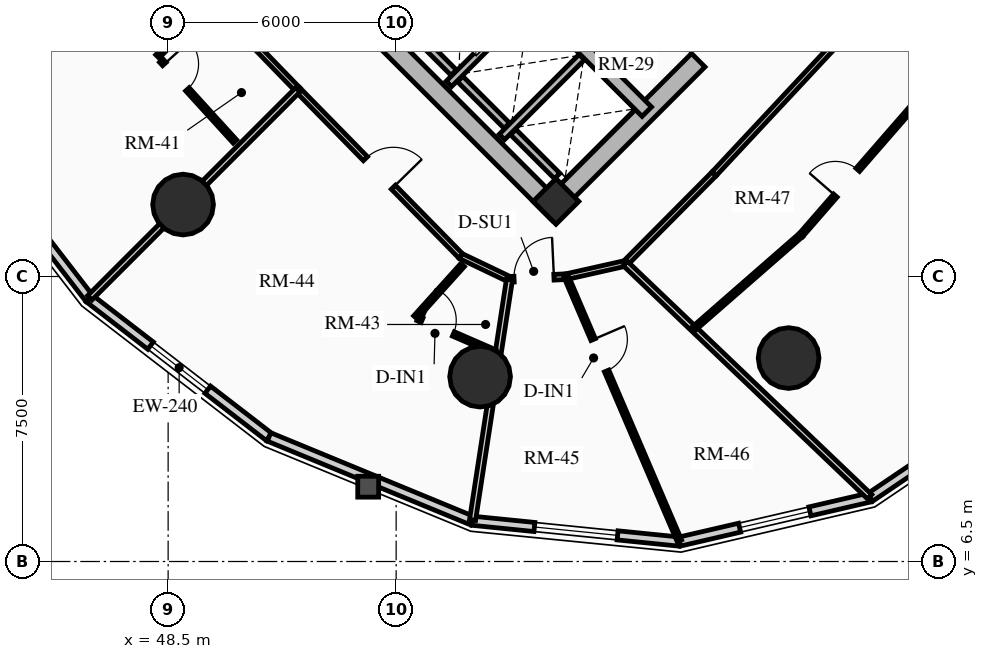
"""IFC4 building model, lengths in metres.
Left out: names, types, materials, properties, quantities, classifications, styles, units other than length and angle.
Written with IfcOpenShell. Run it as: python <this file> out.ifc"""

import sys

from ifc_helpers import new_model, si_unit, direction, frame, frame_2d, origin, origin_2d, place, context, subcontext, project, spatial, rectangle, circle, extrude, source, transform, mapped, element, fill, save


model = new_model("IFC4")
c1 = context("Model", 3, precision=1e-05, world=origin(), true_north=direction((0.0, 1.0)))
c2 = subcontext(c1, "Body", "Model", "MODEL_VIEW")
j1 = project(units=[si_unit("LENGTHUNIT", "METRE"), si_unit("PLANEANGLEUNIT", "RADIAN")], contexts=[c1])
p1 = place(None, origin())
s1 = spatial("IfcSite", under=j1, at=p1, CompositionType="ELEMENT")
p2 = place(p1, origin())
s2 = spatial("IfcBuilding", under=s1, at=p2, CompositionType="ELEMENT")
p3 = place(p2, frame((0.0, 0.0, 51.1)))
s3 = spatial("IfcBuildingStorey", under=s2, at=p3, CompositionType="ELEMENT", Elevation=51.1)
p4 = place(p3, frame((58.773, 15.661, 0.0), z_axis=(0.0, 0.0, 1.0), x_axis=(-0.707106781187, 0.707106781187, 0.0)))
e1 = element("IfcWall", 1, at=p4, inside=s3, PredefinedType="SHEAR", context=c2, shape_type="SweptSolid", body=[
    extrude(rectangle(XDim=14.3, YDim=0.5, at=frame_2d((7.15, 0.0))), origin(), (0.0, 0.0, 1.0), 2.91),
])
p5 = place(p3, frame((58.596, 15.838, 0.0), z_axis=(0.0, 0.0, 1.0), x_axis=(0.707106781187, 0.707106781187, 0.0)))
e2 = element("IfcWall", 2, at=p5, inside=s3, PredefinedType="SHEAR", context=c2, shape_type="SweptSolid", body=[
    extrude(rectangle(XDim=10.7, YDim=0.5, at=frame_2d((5.35, 0.0))), origin(), (0.0, 0.0, 1.0), 2.91),
])
m1 = source(origin(), c2, "Body", "SweptSolid", [
    extrude(rectangle(XDim=1.5, YDim=2.02, at=frame_2d((0.75, 1.01))), frame((0.0, 0.26, 0.0), z_axis=(0.0, -1.0, 0.0), x_axis=(1.0, 0.0, 0.0)), (0.0, 0.0, 1.0), 0.52),
])
p6 = place(p5, frame((5.45, 0.0, 0.0)))
e3 = element("IfcOpeningElement", 3, at=p6, cuts=e2, PredefinedType="OPENING", context=c2, shape_type="MappedRepresentation", body=[
    mapped(m1, transform((0.0, 0.0, 0.0), x_axis=(1.0, 0.0, 0.0), y_axis=(0.0, 1.0, 0.0), z_axis=(0.0, 0.0, 1.0), scale=1.0)),
])
p7 = place(p3, frame((61.096, 18.338, 0.0), z_axis=(0.0, 0.0, 1.0), x_axis=(-0.707106781187, 0.707106781187, 0.0)))
e4 = element("IfcWall", 4, at=p7, inside=s3, PredefinedType="SHEAR", context=c2, shape_type="SweptSolid", body=[
    extrude(rectangle(XDim=13.8, YDim=0.35, at=frame_2d((6.9, 0.0))), origin(), (0.0, 0.0, 1.0), 2.91),
])
m2 = source(origin(), c2, "Body", "SweptSolid", [
    extrude(rectangle(XDim=1.1, YDim=2.015, at=frame_2d((0.55, 1.007))), frame((0.0, 0.185, 0.0), z_axis=(0.0, -1.0, 0.0), x_axis=(1.0, 0.0, 0.0)), (0.0, 0.0, 1.0), 0.37),
])
p8 = place(p7, frame((4.9, 0.0, 0.0)))
e5 = element("IfcOpeningElement", 5, at=p8, cuts=e4, PredefinedType="OPENING", context=c2, shape_type="MappedRepresentation", body=[
    mapped(m2, transform((0.0, 0.0, 0.0), x_axis=(1.0, 0.0, 0.0), y_axis=(0.0, 1.0, 0.0), z_axis=(0.0, 0.0, 1.0), scale=1.0)),
])
m3 = source(origin(), c2, "Body", "SweptSolid", [
    extrude(rectangle(XDim=1.15, YDim=2.02, at=frame_2d((0.575, 1.01))), frame((0.0, 0.185, 0.0), z_axis=(0.0, -1.0, 0.0), x_axis=(1.0, 0.0, 0.0)), (0.0, 0.0, 1.0), 0.37),
])
p9 = place(p7, frame((7.32, 0.0, 0.0)))
e6 = element("IfcOpeningElement", 6, at=p9, cuts=e4, PredefinedType="OPENING", context=c2, shape_type="MappedRepresentation", body=[
    mapped(m3, transform((0.0, 0.0, 0.0), x_axis=(1.0, 0.0, 0.0), y_axis=(0.0, 1.0, 0.0), z_axis=(0.0, 0.0, 1.0), scale=1.0)),
])
p10 = place(p3, frame((58.706, 15.976, 0.0), z_axis=(0.0, 0.0, 1.0), x_axis=(0.707106781187, 0.707106781187, 0.0)))
e7 = element("IfcColumn", 7, at=p10, inside=s3, PredefinedType="COLUMN", context=c2, shape_type="SweptSolid", body=[
    extrude(rectangle(XDim=0.85, YDim=0.85, at=origin_2d()), origin(), (0.0, 0.0, 1.0), 2.91),
])
for number, where, z_axis, x_axis in (
    (8, (48.893, 15.893, 0.0), (0.0, 0.0, 1.0), (1.0, 0.0, 0.0)),
    (9, (56.709, 11.365, 0.0), (0.0, 0.0, 1.0), (1.0, 0.0, 0.0)),
    (10, (64.827, 11.854, 0.0), (0.0, 0.0, 1.0), (1.0, 0.0, 0.0)),
):
    element("IfcColumn", number, at=place(p3, frame(where, z_axis=z_axis, x_axis=x_axis)), inside=s3, PredefinedType="USERDEFINED", context=c2, shape_type="SweptSolid", body=[
        extrude(circle(Radius=0.8, at=origin_2d()), origin(), (0.0, 0.0, 1.0), 2.91),
    ])
p11 = place(p3, frame((46.425, 13.425, 0.0), z_axis=(0.0, 0.0, 1.0), x_axis=(-0.610502519057, 0.792014314407, 0.0)))
e11 = element("IfcWall", 11, at=p11, inside=s3, PredefinedType="SOLIDWALL", context=c2, shape_type="SweptSolid", body=[
    extrude(rectangle(XDim=5.973, YDim=0.24, at=frame_2d((2.987, 0.0))), origin(), (0.0, 0.0, 1.0), 2.073),
])
p12 = place(p3, frame((51.156, 9.778, 0.0), z_axis=(0.0, 0.0, 1.0), x_axis=(-0.792014314407, 0.610502519057, 0.0)))
e12 = element("IfcWall", 12, at=p12, inside=s3, PredefinedType="SOLIDWALL", context=c2, shape_type="SweptSolid", body=[
    extrude(rectangle(XDim=5.973, YDim=0.24, at=frame_2d((2.987, 0.0))), origin(), (0.0, 0.0, 1.0), 2.073),
])
m4 = source(origin(), c2, "Body", "SweptSolid", [
    extrude(rectangle(XDim=1.9, YDim=1.35, at=frame_2d((0.95, 0.675))), frame((0.0, 0.13, 0.0), z_axis=(0.0, -1.0, 0.0), x_axis=(1.0, 0.0, 0.0)), (0.0, 0.0, 1.0), 0.26),
])
p13 = place(p12, frame((2.037, 0.0, 0.65)))
e13 = element("IfcOpeningElement", 13, at=p13, cuts=e12, PredefinedType="OPENING", context=c2, shape_type="MappedRepresentation", body=[
    mapped(m4, transform((0.0, 0.0, 0.0), x_axis=(1.0, 0.0, 0.0), y_axis=(0.0, 1.0, 0.0), z_axis=(0.0, 0.0, 1.0), scale=1.0)),
])
p14 = place(p3, frame((56.507, 7.572, 0.0), z_axis=(0.0, 0.0, 1.0), x_axis=(-0.924563629567, 0.381027682565, 0.0)))
e14 = element("IfcWall", 14, at=p14, inside=s3, PredefinedType="SOLIDWALL", context=c2, shape_type="SweptSolid", body=[
    extrude(rectangle(XDim=5.789, YDim=0.24, at=frame_2d((2.894, 0.0))), origin(), (0.0, 0.0, 1.0), 2.073),
])
p15 = place(p3, frame((61.957, 7.024, 0.0), z_axis=(0.0, 0.0, 1.0), x_axis=(-0.994970765694, 0.100165739718, 0.0)))
e15 = element("IfcWall", 15, at=p15, inside=s3, PredefinedType="SOLIDWALL", context=c2, shape_type="SweptSolid", body=[
    extrude(rectangle(XDim=5.477, YDim=0.24, at=frame_2d((2.738, 0.0))), origin(), (0.0, 0.0, 1.0), 2.073),
])
m5 = source(origin(), c2, "Body", "SweptSolid", [
    extrude(rectangle(XDim=2.2, YDim=1.35, at=frame_2d((1.1, 0.675))), frame((0.0, 0.13, 0.0), z_axis=(0.0, -1.0, 0.0), x_axis=(1.0, 0.0, 0.0)), (0.0, 0.0, 1.0), 0.26),
])
p16 = place(p15, frame((1.638, 0.0, 0.65)))
e16 = element("IfcOpeningElement", 16, at=p16, cuts=e15, PredefinedType="OPENING", context=c2, shape_type="MappedRepresentation", body=[
    mapped(m5, transform((0.0, 0.0, 0.0), x_axis=(1.0, 0.0, 0.0), y_axis=(0.0, 1.0, 0.0), z_axis=(0.0, 0.0, 1.0), scale=1.0)),
])
p17 = place(p3, frame((66.969, 8.186, 0.0), z_axis=(0.0, 0.0, 1.0), x_axis=(-0.974166016949, -0.225833060959, 0.0)))
e17 = element("IfcWall", 17, at=p17, inside=s3, PredefinedType="SOLIDWALL", context=c2, shape_type="SweptSolid", body=[
    extrude(rectangle(XDim=5.146, YDim=0.24, at=frame_2d((2.573, 0.0))), origin(), (0.0, 0.0, 1.0), 2.073),
])
p18 = place(p17, frame((1.623, 0.0, 0.65)))
e18 = element("IfcOpeningElement", 18, at=p18, cuts=e17, PredefinedType="OPENING", context=c2, shape_type="MappedRepresentation", body=[
    mapped(m4, transform((0.0, 0.0, 0.0), x_axis=(1.0, 0.0, 0.0), y_axis=(0.0, 1.0, 0.0), z_axis=(0.0, 0.0, 1.0), scale=1.0)),
])
p19 = place(p3, frame((71.055, 10.945, 0.0), z_axis=(0.0, 0.0, 1.0), x_axis=(-0.828736708604, -0.559638693991, 0.0)))
e19 = element("IfcWall", 19, at=p19, inside=s3, PredefinedType="SOLIDWALL", context=c2, shape_type="SweptSolid", body=[
    extrude(rectangle(XDim=4.93, YDim=0.24, at=frame_2d((2.465, 0.0))), origin(), (0.0, 0.0, 1.0), 2.073),
])
p20 = place(p3, frame((55.888, 19.069, 0.0), z_axis=(0.0, 0.0, 1.0), x_axis=(0.707106781187, 0.707106781187, 0.0)))
e20 = element("IfcWall", 20, at=p20, inside=s3, PredefinedType="SHEAR", context=c2, shape_type="SweptSolid", body=[
    extrude(rectangle(XDim=2.97, YDim=0.2, at=frame_2d((1.485, 0.0))), origin(), (0.0, 0.0, 1.0), 2.91),
])
p21 = place(p3, frame((56.015, 19.366, 0.0), z_axis=(0.0, 0.0, 1.0), x_axis=(-0.707106781187, 0.707106781187, 0.0)))
e21 = element("IfcWall", 21, at=p21, inside=s3, PredefinedType="SHEAR", context=c2, shape_type="SweptSolid", body=[
    extrude(rectangle(XDim=2.44, YDim=0.2, at=frame_2d((1.22, 0.0))), origin(), (0.0, 0.0, 1.0), 2.91),
])
p22 = place(p3, frame((57.284, 17.673, 0.0), z_axis=(0.0, 0.0, 1.0), x_axis=(0.707147878904, 0.70706568108, 0.0)))
e22 = element("IfcWall", 22, at=p22, inside=s3, PredefinedType="SHEAR", context=c2, shape_type="SweptSolid", body=[
    extrude(rectangle(XDim=2.97, YDim=0.2, at=frame_2d((1.485, 0.0))), origin(), (0.0, 0.0, 1.0), 2.91),
])
p23 = place(p3, frame((57.412, 17.97, 0.0), z_axis=(0.0, 0.0, 1.0), x_axis=(-0.707106781187, 0.707106781187, 0.0)))
e23 = element("IfcWall", 23, at=p23, inside=s3, PredefinedType="SHEAR", context=c2, shape_type="SweptSolid", body=[
    extrude(rectangle(XDim=1.735, YDim=0.2, at=frame_2d((0.867, 0.0))), origin(), (0.0, 0.0, 1.0), 2.91),
])
p24 = place(p3, frame((58.737, 16.644, 0.0), z_axis=(0.0, 0.0, 1.0), x_axis=(-0.707032117043, 0.707181437447, 0.0)))
e24 = element("IfcWall", 24, at=p24, inside=s3, PredefinedType="SHEAR", context=c2, shape_type="SweptSolid", body=[
    extrude(rectangle(XDim=1.635, YDim=0.2, at=frame_2d((0.817, 0.0))), origin(), (0.0, 0.0, 1.0), 2.91),
])
p25 = place(p3, frame((47.729, 23.23, 0.0), z_axis=(0.0, 0.0, 1.0), x_axis=(0.696119834292, -0.717925606386, 0.0)))
e25 = element("IfcWall", 25, at=p25, inside=s3, PredefinedType="PARTITIONING", context=c2, shape_type="SweptSolid", body=[
    extrude(rectangle(XDim=6.012, YDim=0.15, at=frame_2d((3.006, 0.0))), origin(), (0.0, 0.0, 1.0), 2.635),
])
p26 = place(p3, frame((51.914, 18.914, 0.0), z_axis=(0.0, 0.0, 1.0), x_axis=(0.6999614951, -0.71418058317, 0.0)))
e26 = element("IfcWall", 26, at=p26, inside=s3, PredefinedType="PARTITIONING", context=c2, shape_type="SweptSolid", body=[
    extrude(rectangle(XDim=6.13, YDim=0.15, at=frame_2d((3.065, 0.0))), origin(), (0.0, 0.0, 1.0), 2.159),
])
m6 = source(origin(), c2, "Body", "SweptSolid", [
    extrude(rectangle(XDim=1.05, YDim=2.015, at=frame_2d((0.525, 1.007))), frame((0.0, 0.085, 0.0), z_axis=(0.0, -1.0, 0.0), x_axis=(1.0, 0.0, 0.0)), (0.0, 0.0, 1.0), 0.17),
])
p27 = place(p26, frame((2.54, 0.0, 0.0)))
e27 = element("IfcOpeningElement", 27, at=p27, cuts=e26, PredefinedType="OPENING", context=c2, shape_type="MappedRepresentation", body=[
    mapped(m6, transform((0.0, 0.0, 0.0), x_axis=(1.0, 0.0, 0.0), y_axis=(0.0, 1.0, 0.0), z_axis=(0.0, 0.0, 1.0), scale=1.0)),
])
p28 = place(p3, frame((56.204, 14.536, 0.0), z_axis=(0.0, 0.0, 1.0), x_axis=(0.902244982981, -0.431223828986, 0.0)))
e28 = element("IfcWall", 28, at=p28, inside=s3, PredefinedType="PARTITIONING", context=c2, shape_type="SweptSolid", body=[
    extrude(rectangle(XDim=1.417, YDim=0.15, at=frame_2d((0.708, 0.0))), origin(), (0.0, 0.0, 1.0), 2.205),
])
p29 = place(p3, frame((57.483, 13.925, 0.0), z_axis=(0.0, 0.0, 1.0), x_axis=(0.998884345706, 0.047223552414, 0.0)))
e29 = element("IfcWall", 29, at=p29, inside=s3, PredefinedType="PARTITIONING", context=c2, shape_type="SweptSolid", body=[
    extrude(rectangle(XDim=1.494, YDim=0.15, at=frame_2d((0.747, 0.0))), origin(), (0.0, 0.0, 1.0), 2.159),
])
p30 = place(p29, frame((0.12, 0.0, 0.0)))
e30 = element("IfcOpeningElement", 30, at=p30, cuts=e29, PredefinedType="OPENING", context=c2, shape_type="MappedRepresentation", body=[
    mapped(m6, transform((0.0, 0.0, 0.0), x_axis=(1.0, 0.0, 0.0), y_axis=(0.0, 1.0, 0.0), z_axis=(0.0, 0.0, 1.0), scale=1.0)),
])
p31 = place(p3, frame((58.975, 13.996, 0.0), z_axis=(0.0, 0.0, 1.0), x_axis=(0.975700857392, 0.219106907431, 0.0)))
e31 = element("IfcWall", 31, at=p31, inside=s3, PredefinedType="PARTITIONING", context=c2, shape_type="SweptSolid", body=[
    extrude(rectangle(XDim=1.591, YDim=0.15, at=frame_2d((0.795, 0.0))), origin(), (0.0, 0.0, 1.0), 2.205),
])
p32 = place(p3, frame((60.528, 14.344, 0.0), z_axis=(0.0, 0.0, 1.0), x_axis=(0.704381645997, 0.709821454158, 0.0)))
e32 = element("IfcWall", 32, at=p32, inside=s3, PredefinedType="PARTITIONING", context=c2, shape_type="SweptSolid", body=[
    extrude(rectangle(XDim=3.321, YDim=0.15, at=frame_2d((1.661, 0.0))), origin(), (0.0, 0.0, 1.0), 2.159),
])
p33 = place(p3, frame((62.867, 16.702, 0.0), z_axis=(0.0, 0.0, 1.0), x_axis=(0.682449206191, 0.73093302085, 0.0)))
e33 = element("IfcWall", 33, at=p33, inside=s3, PredefinedType="PARTITIONING", context=c2, shape_type="SweptSolid", body=[
    extrude(rectangle(XDim=6.642, YDim=0.15, at=frame_2d((3.321, 0.0))), origin(), (0.0, 0.0, 1.0), 2.159),
])
p34 = place(p3, frame((51.914, 18.914, 0.0), z_axis=(0.0, 0.0, 1.0), x_axis=(-0.707106781187, -0.707106781187, 0.0)))
e34 = element("IfcWall", 34, at=p34, inside=s3, PredefinedType="PARTITIONING", context=c2, shape_type="SweptSolid", body=[
    extrude(rectangle(XDim=7.743, YDim=0.16, at=frame_2d((3.872, 0.0))), origin(), (0.0, 0.0, 1.0), 2.073),
])
p35 = place(p3, frame((57.483, 13.925, 0.0), z_axis=(0.0, 0.0, 1.0), x_axis=(-0.151762268519, -0.988417024264, 0.0)))
e35 = element("IfcWall", 35, at=p35, inside=s3, PredefinedType="PARTITIONING", context=c2, shape_type="SweptSolid", body=[
    extrude(rectangle(XDim=6.407, YDim=0.16, at=frame_2d((3.204, 0.0))), origin(), (0.0, 0.0, 1.0), 2.073),
])
p36 = place(p3, frame((60.528, 14.344, 0.0), z_axis=(0.0, 0.0, 1.0), x_axis=(0.723320016743, -0.690512963947, 0.0)))
e36 = element("IfcWall", 36, at=p36, inside=s3, PredefinedType="PARTITIONING", context=c2, shape_type="SweptSolid", body=[
    extrude(rectangle(XDim=8.893, YDim=0.16, at=frame_2d((4.446, 0.0))), origin(), (0.0, 0.0, 1.0), 2.073),
])
p37 = place(p3, frame((49.498, 21.087, 0.0), z_axis=(0.0, 0.0, 1.0), x_axis=(-0.702129708151, -0.71204906638, 0.0)))
e37 = element("IfcWall", 37, at=p37, inside=s3, PredefinedType="PARTITIONING", context=c2, shape_type="SweptSolid", body=[
    extrude(rectangle(XDim=1.821, YDim=0.125, at=frame_2d((0.911, 0.0))), origin(), (0.0, 0.0, 1.0), 2.635),
])
p38 = place(p3, frame((48.32, 19.68, 0.0), z_axis=(0.0, 0.0, 1.0), x_axis=(0.673403410236, -0.739275217414, 0.0)))
e38 = element("IfcWall", 38, at=p38, inside=s3, PredefinedType="PARTITIONING", context=c2, shape_type="SweptSolid", body=[
    extrude(rectangle(XDim=2.876, YDim=0.125, at=frame_2d((1.438, 0.0))), origin(), (0.0, 0.0, 1.0), 2.635),
])
m7 = source(origin(), c2, "Body", "SweptSolid", [
    extrude(rectangle(XDim=0.9, YDim=2.005, at=frame_2d((0.45, 1.002))), frame((0.0, 0.073, 0.0), z_axis=(0.0, -1.0, 0.0), x_axis=(1.0, 0.0, 0.0)), (0.0, 0.0, 1.0), 0.145),
])
p39 = place(p38, frame((0.12, 0.0, 0.0)))
e39 = element("IfcOpeningElement", 39, at=p39, cuts=e38, PredefinedType="OPENING", context=c2, shape_type="MappedRepresentation", body=[
    mapped(m7, transform((0.0, 0.0, 0.0), x_axis=(1.0, 0.0, 0.0), y_axis=(0.0, 1.0, 0.0), z_axis=(0.0, 0.0, 1.0), scale=1.0)),
])
p40 = place(p3, frame((56.249, 14.302, 0.0), z_axis=(0.0, 0.0, 1.0), x_axis=(-0.669226451819, -0.743058514645, 0.0)))
e40 = element("IfcWall", 40, at=p40, inside=s3, PredefinedType="PARTITIONING", context=c2, shape_type="SweptSolid", body=[
    extrude(rectangle(XDim=1.855, YDim=0.125, at=frame_2d((0.927, 0.0))), origin(), (0.0, 0.0, 1.0), 2.205),
])
p41 = place(p3, frame((55.071, 12.896, 0.0), z_axis=(0.0, 0.0, 1.0), x_axis=(0.916939896123, -0.399025346184, 0.0)))
e41 = element("IfcWall", 41, at=p41, inside=s3, PredefinedType="PARTITIONING", context=c2, shape_type="SweptSolid", body=[
    extrude(rectangle(XDim=2.208, YDim=0.125, at=frame_2d((1.104, 0.0))), origin(), (0.0, 0.0, 1.0), 2.159),
])
p42 = place(p41, frame((0.12, 0.0, 0.0)))
e42 = element("IfcOpeningElement", 42, at=p42, cuts=e41, PredefinedType="OPENING", context=c2, shape_type="MappedRepresentation", body=[
    mapped(m7, transform((0.0, 0.0, 0.0), x_axis=(1.0, 0.0, 0.0), y_axis=(0.0, 1.0, 0.0), z_axis=(0.0, 0.0, 1.0), scale=1.0)),
])
p43 = place(p3, frame((58.975, 13.996, 0.0), z_axis=(0.0, 0.0, 1.0), x_axis=(0.393755664375, -0.919215141723, 0.0)))
e43 = element("IfcWall", 43, at=p43, inside=s3, PredefinedType="PARTITIONING", context=c2, shape_type="SweptSolid", body=[
    extrude(rectangle(XDim=7.563, YDim=0.125, at=frame_2d((3.782, 0.0))), origin(), (0.0, 0.0, 1.0), 2.073),
])
p44 = place(p43, frame((1.8, 0.0, 0.0)))
e44 = element("IfcOpeningElement", 44, at=p44, cuts=e43, PredefinedType="OPENING", context=c2, shape_type="MappedRepresentation", body=[
    mapped(m7, transform((0.0, 0.0, 0.0), x_axis=(1.0, 0.0, 0.0), y_axis=(0.0, 1.0, 0.0), z_axis=(0.0, 0.0, 1.0), scale=1.0)),
])
p45 = place(p3, frame((62.329, 12.625, 0.0), z_axis=(0.0, 0.0, 1.0), x_axis=(0.753237140985, 0.657749047465, 0.0)))
e45 = element("IfcWall", 45, at=p45, inside=s3, PredefinedType="PARTITIONING", context=c2, shape_type="SweptSolid", body=[
    extrude(rectangle(XDim=3.753, YDim=0.125, at=frame_2d((1.877, 0.0))), origin(), (0.0, 0.0, 1.0), 2.159),
])
p46 = place(p3, frame((65.156, 15.094, 0.0), z_axis=(0.0, 0.0, 1.0), x_axis=(0.656356662483, 0.754450748302, 0.0)))
e46 = element("IfcWall", 46, at=p46, inside=s3, PredefinedType="PARTITIONING", context=c2, shape_type="SweptSolid", body=[
    extrude(rectangle(XDim=6.147, YDim=0.125, at=frame_2d((3.074, 0.0))), origin(), (0.0, 0.0, 1.0), 2.159),
])
p47 = place(p46, frame((1.372, 0.0, 0.0)))
e47 = element("IfcOpeningElement", 47, at=p47, cuts=e46, PredefinedType="OPENING", context=c2, shape_type="MappedRepresentation", body=[
    mapped(m7, transform((0.0, 0.0, 0.0), x_axis=(1.0, 0.0, 0.0), y_axis=(0.0, 1.0, 0.0), z_axis=(0.0, 0.0, 1.0), scale=1.0)),
])
m8 = source(origin(), c2, "Body", "SweptSolid", [
    extrude(rectangle(XDim=1.9, YDim=1.35, at=frame_2d((0.95, 0.675))), frame((0.0, 0.03, 0.0), z_axis=(0.0, -1.0, 0.0), x_axis=(1.0, 0.0, 0.0)), (0.0, 0.0, 1.0), 0.06),
])
p48 = place(p13, origin())
e48 = element("IfcWindow", 48, at=p48, inside=s3, PartitioningType="DOUBLE_PANEL_VERTICAL", PredefinedType="WINDOW", context=c2, shape_type="MappedRepresentation", body=[
    mapped(m8, transform((0.0, 0.0, 0.0), x_axis=(1.0, 0.0, 0.0), y_axis=(0.0, 1.0, 0.0), z_axis=(0.0, 0.0, 1.0), scale=1.0)),
])
fill(e13, e48)
m9 = source(origin(), c2, "Body", "SweptSolid", [
    extrude(rectangle(XDim=2.2, YDim=1.35, at=frame_2d((1.1, 0.675))), frame((0.0, 0.03, 0.0), z_axis=(0.0, -1.0, 0.0), x_axis=(1.0, 0.0, 0.0)), (0.0, 0.0, 1.0), 0.06),
])
p49 = place(p16, origin())
e49 = element("IfcWindow", 49, at=p49, inside=s3, PartitioningType="DOUBLE_PANEL_VERTICAL", PredefinedType="WINDOW", context=c2, shape_type="MappedRepresentation", body=[
    mapped(m9, transform((0.0, 0.0, 0.0), x_axis=(1.0, 0.0, 0.0), y_axis=(0.0, 1.0, 0.0), z_axis=(0.0, 0.0, 1.0), scale=1.0)),
])
fill(e16, e49)
p50 = place(p18, origin())
e50 = element("IfcWindow", 50, at=p50, inside=s3, PartitioningType="DOUBLE_PANEL_VERTICAL", PredefinedType="WINDOW", context=c2, shape_type="MappedRepresentation", body=[
    mapped(m8, transform((0.0, 0.0, 0.0), x_axis=(1.0, 0.0, 0.0), y_axis=(0.0, 1.0, 0.0), z_axis=(0.0, 0.0, 1.0), scale=1.0)),
])
fill(e18, e50)
m10 = source(origin(), c2, "Body", "SweptSolid", [
    extrude(rectangle(XDim=1.5, YDim=2.02, at=frame_2d((0.75, 1.01))), frame((0.0, 0.025, 0.0), z_axis=(0.0, -1.0, 0.0), x_axis=(1.0, 0.0, 0.0)), (0.0, 0.0, 1.0), 0.05),
])
p51 = place(p6, origin())
e51 = element("IfcDoor", 51, at=p51, inside=s3, OperationType="DOUBLE_DOOR_SINGLE_SWING", PredefinedType="DOOR", context=c2, shape_type="MappedRepresentation", body=[
    mapped(m10, transform((0.0, 0.0, 0.0), x_axis=(1.0, 0.0, 0.0), y_axis=(0.0, 1.0, 0.0), z_axis=(0.0, 0.0, 1.0), scale=1.0)),
])
fill(e3, e51)
m11 = source(origin(), c2, "Body", "SweptSolid", [
    extrude(rectangle(XDim=0.9, YDim=2.005, at=frame_2d((0.45, 1.002))), frame((0.0, 0.025, 0.0), z_axis=(0.0, -1.0, 0.0), x_axis=(1.0, 0.0, 0.0)), (0.0, 0.0, 1.0), 0.05),
])
p52 = place(p39, origin())
e52 = element("IfcDoor", 52, at=p52, inside=s3, OperationType="SINGLE_SWING_LEFT", PredefinedType="DOOR", context=c2, shape_type="MappedRepresentation", body=[
    mapped(m11, transform((0.0, 0.0, 0.0), x_axis=(1.0, 0.0, 0.0), y_axis=(0.0, 1.0, 0.0), z_axis=(0.0, 0.0, 1.0), scale=1.0)),
])
fill(e39, e52)
m12 = source(origin(), c2, "Body", "SweptSolid", [
    extrude(rectangle(XDim=1.05, YDim=2.015, at=frame_2d((0.525, 1.007))), frame((0.0, 0.025, 0.0), z_axis=(0.0, -1.0, 0.0), x_axis=(1.0, 0.0, 0.0)), (0.0, 0.0, 1.0), 0.05),
])
p53 = place(p27, origin())
e53 = element("IfcDoor", 53, at=p53, inside=s3, OperationType="SINGLE_SWING_RIGHT", PredefinedType="DOOR", context=c2, shape_type="MappedRepresentation", body=[
    mapped(m12, transform((0.0, 0.0, 0.0), x_axis=(1.0, 0.0, 0.0), y_axis=(0.0, 1.0, 0.0), z_axis=(0.0, 0.0, 1.0), scale=1.0)),
])
fill(e27, e53)
p54 = place(p42, origin())
e54 = element("IfcDoor", 54, at=p54, inside=s3, OperationType="SINGLE_SWING_LEFT", PredefinedType="DOOR", context=c2, shape_type="MappedRepresentation", body=[
    mapped(m11, transform((0.0, 0.0, 0.0), x_axis=(1.0, 0.0, 0.0), y_axis=(0.0, 1.0, 0.0), z_axis=(0.0, 0.0, 1.0), scale=1.0)),
])
fill(e42, e54)
p55 = place(p30, origin())
e55 = element("IfcDoor", 55, at=p55, inside=s3, OperationType="SINGLE_SWING_RIGHT", PredefinedType="DOOR", context=c2, shape_type="MappedRepresentation", body=[
    mapped(m12, transform((0.0, 0.0, 0.0), x_axis=(1.0, 0.0, 0.0), y_axis=(0.0, 1.0, 0.0), z_axis=(0.0, 0.0, 1.0), scale=1.0)),
])
fill(e30, e55)
p56 = place(p44, origin())
e56 = element("IfcDoor", 56, at=p56, inside=s3, OperationType="SINGLE_SWING_LEFT", PredefinedType="DOOR", context=c2, shape_type="MappedRepresentation", body=[
    mapped(m11, transform((0.0, 0.0, 0.0), x_axis=(1.0, 0.0, 0.0), y_axis=(0.0, 1.0, 0.0), z_axis=(0.0, 0.0, 1.0), scale=1.0)),
])
fill(e44, e56)
p57 = place(p47, origin())
e57 = element("IfcDoor", 57, at=p57, inside=s3, OperationType="SINGLE_SWING_LEFT", PredefinedType="DOOR", context=c2, shape_type="MappedRepresentation", body=[
    mapped(m11, transform((0.0, 0.0, 0.0), x_axis=(1.0, 0.0, 0.0), y_axis=(0.0, 1.0, 0.0), z_axis=(0.0, 0.0, 1.0), scale=1.0)),
])
fill(e47, e57)
save(model, sys.argv[1])
